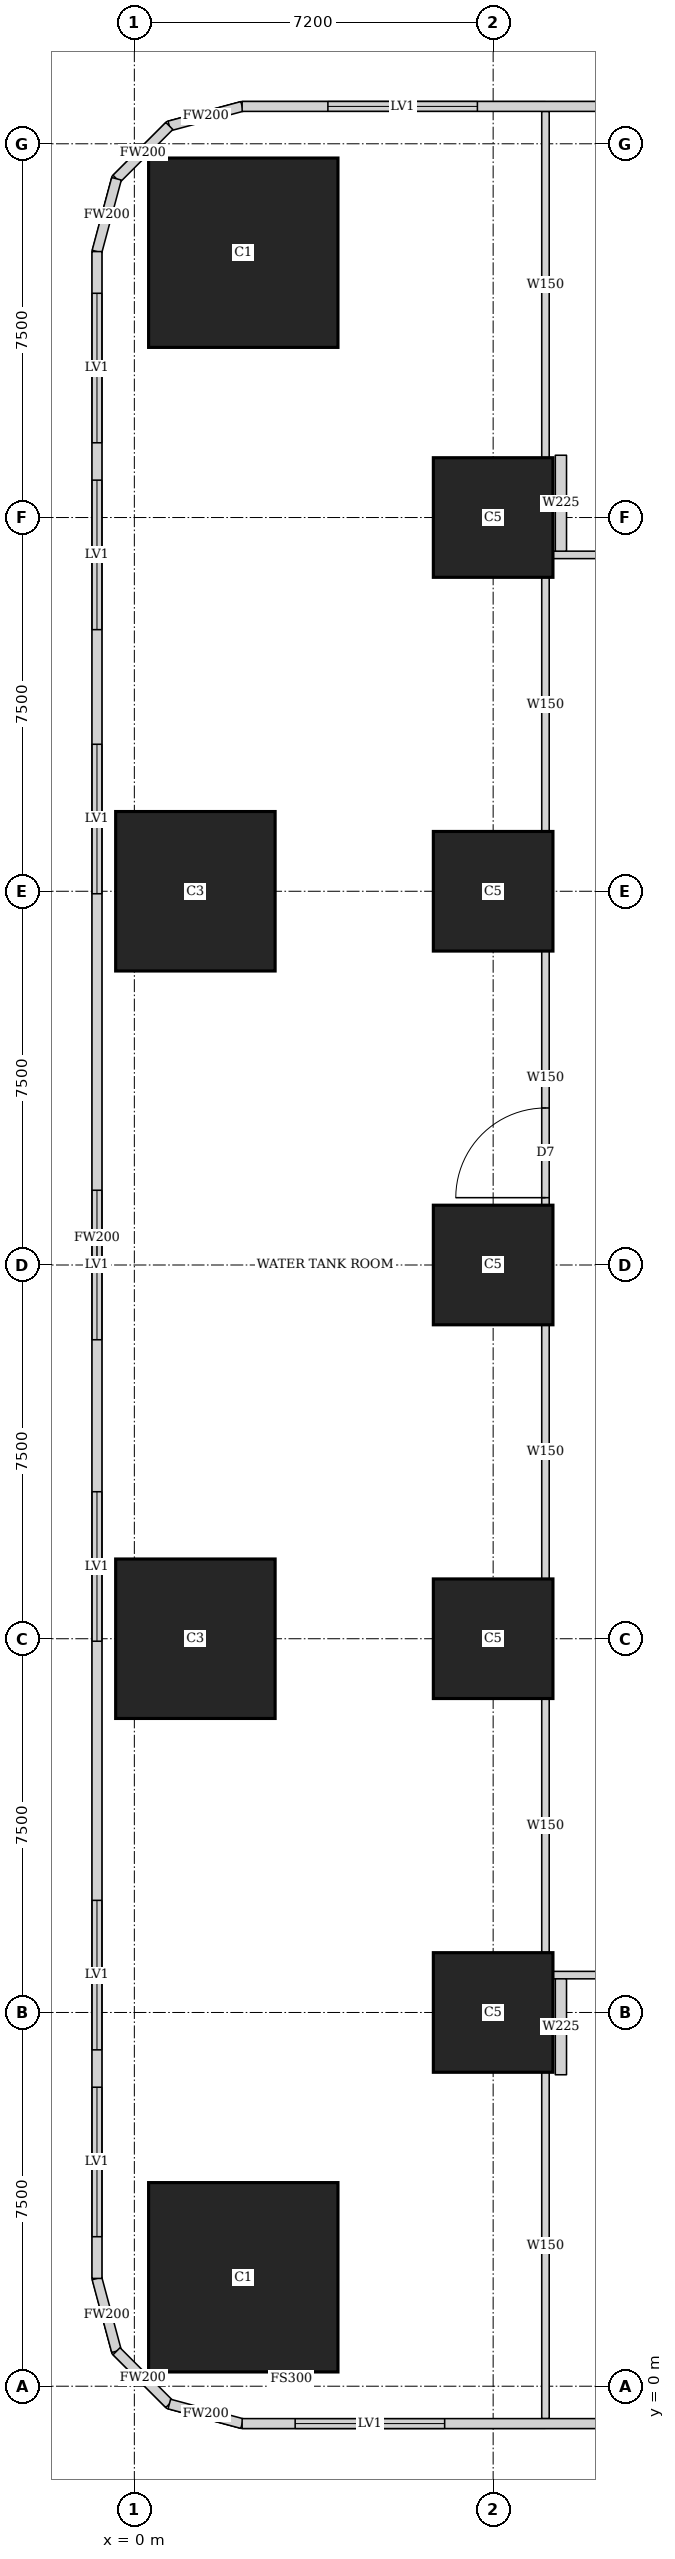
"""IFC4 building model, lengths in metres.
Left out: names, types, materials, properties, quantities, classifications, styles, units other than length and angle.
Written with IfcOpenShell. Run it as: python <this file> out.ifc"""

import sys

from ifc_helpers import new_model, si_unit, direction, frame, frame_2d, origin, origin_2d, place, context, subcontext, project, spatial, rectangle, extrude, element, fill, save


model = new_model("IFC4")
c1 = context("Model", 3, precision=1e-05, world=origin(), true_north=direction((0.0, 1.0)))
c2 = subcontext(c1, "Body", "Model", "MODEL_VIEW")
j1 = project(units=[si_unit("LENGTHUNIT", "METRE"), si_unit("PLANEANGLEUNIT", "RADIAN")], contexts=[c1])
p1 = place(None, origin())
s1 = spatial("IfcSite", under=j1, at=p1, CompositionType="ELEMENT")
p2 = place(p1, origin())
s2 = spatial("IfcBuilding", under=s1, at=p2, CompositionType="ELEMENT")
p3 = place(p2, frame((0.0, 0.0, 14.6)))
s3 = spatial("IfcBuildingStorey", under=s2, at=p3, CompositionType="ELEMENT", Elevation=14.6)
p4 = place(p3, frame((2.186, 2.186, 0.0), z_axis=(0.0, 0.0, 1.0), x_axis=(1.0, 0.0, 0.0)))
e1 = element("IfcColumn", 1, at=p4, inside=s3, PredefinedType="COLUMN", context=c2, shape_type="SweptSolid", body=[
    extrude(rectangle(XDim=3.8, YDim=3.8, at=origin_2d()), origin(), (0.0, 0.0, 1.0), 5.4),
])
p5 = place(p3, frame((7.2, 7.5, 0.0), z_axis=(0.0, 0.0, 1.0), x_axis=(1.0, 0.0, 0.0)))
e2 = element("IfcColumn", 2, at=p5, inside=s3, PredefinedType="COLUMN", context=c2, shape_type="SweptSolid", body=[
    extrude(rectangle(XDim=2.4, YDim=2.4, at=origin_2d()), origin(), (0.0, 0.0, 1.0), 5.4),
])
p6 = place(p3, frame((1.225, 15.0, 0.0), z_axis=(0.0, 0.0, 1.0), x_axis=(1.0, 0.0, 0.0)))
e3 = element("IfcColumn", 3, at=p6, inside=s3, PredefinedType="COLUMN", context=c2, shape_type="SweptSolid", body=[
    extrude(rectangle(XDim=3.2, YDim=3.2, at=origin_2d()), origin(), (0.0, 0.0, 1.0), 5.4),
])
for number, where, z_axis, x_axis in (
    (4, (7.2, 15.0, 0.0), (0.0, 0.0, 1.0), (1.0, 0.0, 0.0)),
    (5, (7.2, 22.5, 0.0), (0.0, 0.0, 1.0), (1.0, 0.0, 0.0)),
):
    element("IfcColumn", number, at=place(p3, frame(where, z_axis=z_axis, x_axis=x_axis)), inside=s3, PredefinedType="COLUMN", context=c2, shape_type="SweptSolid", body=[
        extrude(rectangle(XDim=2.4, YDim=2.4, at=origin_2d()), origin(), (0.0, 0.0, 1.0), 5.4),
    ])
p7 = place(p3, frame((1.225, 30.0, 0.0), z_axis=(0.0, 0.0, 1.0), x_axis=(1.0, 0.0, 0.0)))
e6 = element("IfcColumn", 6, at=p7, inside=s3, PredefinedType="COLUMN", context=c2, shape_type="SweptSolid", body=[
    extrude(rectangle(XDim=3.2, YDim=3.2, at=origin_2d()), origin(), (0.0, 0.0, 1.0), 5.4),
])
for number, where, z_axis, x_axis in (
    (7, (7.2, 30.0, 0.0), (0.0, 0.0, 1.0), (1.0, 0.0, 0.0)),
    (8, (7.2, 37.5, 0.0), (0.0, 0.0, 1.0), (1.0, 0.0, 0.0)),
):
    element("IfcColumn", number, at=place(p3, frame(where, z_axis=z_axis, x_axis=x_axis)), inside=s3, PredefinedType="COLUMN", context=c2, shape_type="SweptSolid", body=[
        extrude(rectangle(XDim=2.4, YDim=2.4, at=origin_2d()), origin(), (0.0, 0.0, 1.0), 5.4),
    ])
p8 = place(p3, frame((2.186, 42.814, 0.0), z_axis=(0.0, 0.0, 1.0), x_axis=(1.0, 0.0, 0.0)))
e9 = element("IfcColumn", 9, at=p8, inside=s3, PredefinedType="COLUMN", context=c2, shape_type="SweptSolid", body=[
    extrude(rectangle(XDim=3.8, YDim=3.8, at=origin_2d()), origin(), (0.0, 0.0, 1.0), 5.4),
])
p9 = place(p3, frame((2.163, -0.75, 0.0), z_axis=(0.0, 0.0, 1.0), x_axis=(1.0, 0.0, 0.0)))
e10 = element("IfcWall", 10, at=p9, inside=s3, PredefinedType="SOLIDWALL", context=c2, shape_type="SweptSolid", body=[
    extrude(rectangle(XDim=45.628, YDim=0.2, at=frame_2d((22.814, 0.0))), origin(), (0.0, 0.0, 1.0), 5.1),
])
p10 = place(p9, frame((1.064, 0.0, 0.6)))
e11 = element("IfcOpeningElement", 11, at=p10, cuts=e10, PredefinedType="OPENING", context=c2, shape_type="SweptSolid", body=[
    extrude(rectangle(XDim=3.0, YDim=2.4, at=frame_2d((1.5, 1.2))), frame((0.0, 0.11, 0.0), z_axis=(0.0, -1.0, 0.0), x_axis=(1.0, 0.0, 0.0)), (0.0, 0.0, 1.0), 0.22),
])
p11 = place(p9, frame((10.064, 0.0, 0.6)))
e12 = element("IfcOpeningElement", 12, at=p11, cuts=e10, PredefinedType="OPENING", context=c2, shape_type="SweptSolid", body=[
    extrude(rectangle(XDim=3.0, YDim=2.4, at=frame_2d((1.5, 1.2))), frame((0.0, 0.11, 0.0), z_axis=(0.0, -1.0, 0.0), x_axis=(1.0, 0.0, 0.0)), (0.0, 0.0, 1.0), 0.22),
])
p12 = place(p9, frame((18.614, 0.0, 0.6)))
e13 = element("IfcOpeningElement", 13, at=p12, cuts=e10, PredefinedType="OPENING", context=c2, shape_type="SweptSolid", body=[
    extrude(rectangle(XDim=3.0, YDim=2.4, at=frame_2d((1.5, 1.2))), frame((0.0, 0.11, 0.0), z_axis=(0.0, -1.0, 0.0), x_axis=(1.0, 0.0, 0.0)), (0.0, 0.0, 1.0), 0.22),
])
p13 = place(p9, frame((23.814, 0.0, 0.6)))
e14 = element("IfcOpeningElement", 14, at=p13, cuts=e10, PredefinedType="OPENING", context=c2, shape_type="SweptSolid", body=[
    extrude(rectangle(XDim=3.0, YDim=2.4, at=frame_2d((1.5, 1.2))), frame((0.0, 0.11, 0.0), z_axis=(0.0, -1.0, 0.0), x_axis=(1.0, 0.0, 0.0)), (0.0, 0.0, 1.0), 0.22),
])
p14 = place(p9, frame((32.564, 0.0, 0.6)))
e15 = element("IfcOpeningElement", 15, at=p14, cuts=e10, PredefinedType="OPENING", context=c2, shape_type="SweptSolid", body=[
    extrude(rectangle(XDim=3.0, YDim=2.4, at=frame_2d((1.5, 1.2))), frame((0.0, 0.11, 0.0), z_axis=(0.0, -1.0, 0.0), x_axis=(1.0, 0.0, 0.0)), (0.0, 0.0, 1.0), 0.22),
])
p15 = place(p9, frame((38.214, 0.0, 0.6)))
e16 = element("IfcOpeningElement", 16, at=p15, cuts=e10, PredefinedType="OPENING", context=c2, shape_type="SweptSolid", body=[
    extrude(rectangle(XDim=3.0, YDim=2.4, at=frame_2d((1.5, 1.2))), frame((0.0, 0.11, 0.0), z_axis=(0.0, -1.0, 0.0), x_axis=(1.0, 0.0, 0.0)), (0.0, 0.0, 1.0), 0.22),
])
p16 = place(p9, frame((41.564, 0.0, 0.6)))
e17 = element("IfcOpeningElement", 17, at=p16, cuts=e10, PredefinedType="OPENING", context=c2, shape_type="SweptSolid", body=[
    extrude(rectangle(XDim=3.0, YDim=2.4, at=frame_2d((1.5, 1.2))), frame((0.0, 0.11, 0.0), z_axis=(0.0, -1.0, 0.0), x_axis=(1.0, 0.0, 0.0)), (0.0, 0.0, 1.0), 0.22),
])
p17 = place(p3, frame((40.106, 45.75, 0.0), z_axis=(0.0, 0.0, 1.0), x_axis=(-1.0, 0.0, 0.0)))
e18 = element("IfcWall", 18, at=p17, inside=s3, PredefinedType="SOLIDWALL", context=c2, shape_type="SweptSolid", body=[
    extrude(rectangle(XDim=37.943, YDim=0.2, at=frame_2d((18.971, 0.0))), origin(), (0.0, 0.0, 1.0), 5.1),
])
p18 = place(p17, frame((1.722, 0.0, 0.6)))
e19 = element("IfcOpeningElement", 19, at=p18, cuts=e18, PredefinedType="OPENING", context=c2, shape_type="SweptSolid", body=[
    extrude(rectangle(XDim=3.0, YDim=2.4, at=frame_2d((1.5, 1.2))), frame((0.0, 0.11, 0.0), z_axis=(0.0, -1.0, 0.0), x_axis=(1.0, 0.0, 0.0)), (0.0, 0.0, 1.0), 0.22),
])
p19 = place(p17, frame((10.222, 0.0, 0.6)))
e20 = element("IfcOpeningElement", 20, at=p19, cuts=e18, PredefinedType="OPENING", context=c2, shape_type="SweptSolid", body=[
    extrude(rectangle(XDim=3.0, YDim=2.4, at=frame_2d((1.5, 1.2))), frame((0.0, 0.11, 0.0), z_axis=(0.0, -1.0, 0.0), x_axis=(1.0, 0.0, 0.0)), (0.0, 0.0, 1.0), 0.22),
])
p20 = place(p17, frame((16.322, 0.0, 0.6)))
e21 = element("IfcOpeningElement", 21, at=p20, cuts=e18, PredefinedType="OPENING", context=c2, shape_type="SweptSolid", body=[
    extrude(rectangle(XDim=3.0, YDim=2.4, at=frame_2d((1.5, 1.2))), frame((0.0, 0.11, 0.0), z_axis=(0.0, -1.0, 0.0), x_axis=(1.0, 0.0, 0.0)), (0.0, 0.0, 1.0), 0.22),
])
p21 = place(p17, frame((24.222, 0.0, 0.6)))
e22 = element("IfcOpeningElement", 22, at=p21, cuts=e18, PredefinedType="OPENING", context=c2, shape_type="SweptSolid", body=[
    extrude(rectangle(XDim=3.0, YDim=2.4, at=frame_2d((1.5, 1.2))), frame((0.0, 0.11, 0.0), z_axis=(0.0, -1.0, 0.0), x_axis=(1.0, 0.0, 0.0)), (0.0, 0.0, 1.0), 0.22),
])
p22 = place(p17, frame((33.222, 0.0, 0.6)))
e23 = element("IfcOpeningElement", 23, at=p22, cuts=e18, PredefinedType="OPENING", context=c2, shape_type="SweptSolid", body=[
    extrude(rectangle(XDim=3.0, YDim=2.4, at=frame_2d((1.5, 1.2))), frame((0.0, 0.11, 0.0), z_axis=(0.0, -1.0, 0.0), x_axis=(1.0, 0.0, 0.0)), (0.0, 0.0, 1.0), 0.22),
])
p23 = place(p3, frame((2.163, 45.75, 0.0), z_axis=(0.0, 0.0, 1.0), x_axis=(-0.965832000415, -0.259168954497, 0.0)))
e24 = element("IfcWall", 24, at=p23, inside=s3, PredefinedType="SOLIDWALL", context=c2, shape_type="SweptSolid", body=[
    extrude(rectangle(XDim=1.513, YDim=0.2, at=frame_2d((0.756, 0.0))), origin(), (0.0, 0.0, 1.0), 5.1),
])
p24 = place(p3, frame((0.702, 45.358, 0.0), z_axis=(0.0, 0.0, 1.0), x_axis=(-0.707106781187, -0.707106781187, 0.0)))
e25 = element("IfcWall", 25, at=p24, inside=s3, PredefinedType="SOLIDWALL", context=c2, shape_type="SweptSolid", body=[
    extrude(rectangle(XDim=1.499, YDim=0.2, at=frame_2d((0.75, 0.0))), origin(), (0.0, 0.0, 1.0), 5.1),
])
p25 = place(p3, frame((-0.358, 44.298, 0.0), z_axis=(0.0, 0.0, 1.0), x_axis=(-0.259168954497, -0.965832000415, 0.0)))
e26 = element("IfcWall", 26, at=p25, inside=s3, PredefinedType="SOLIDWALL", context=c2, shape_type="SweptSolid", body=[
    extrude(rectangle(XDim=1.513, YDim=0.2, at=frame_2d((0.756, 0.0))), origin(), (0.0, 0.0, 1.0), 5.1),
])
p26 = place(p3, frame((-0.75, 42.837, 0.0), z_axis=(0.0, 0.0, 1.0), x_axis=(0.0, -1.0, 0.0)))
e27 = element("IfcWall", 27, at=p26, inside=s3, PredefinedType="SOLIDWALL", context=c2, shape_type="SweptSolid", body=[
    extrude(rectangle(XDim=40.674, YDim=0.2, at=frame_2d((20.337, 0.0))), origin(), (0.0, 0.0, 1.0), 5.1),
])
p27 = place(p26, frame((0.837, 0.0, 0.6)))
e28 = element("IfcOpeningElement", 28, at=p27, cuts=e27, PredefinedType="OPENING", context=c2, shape_type="SweptSolid", body=[
    extrude(rectangle(XDim=3.0, YDim=2.4, at=frame_2d((1.5, 1.2))), frame((0.0, 0.11, 0.0), z_axis=(0.0, -1.0, 0.0), x_axis=(1.0, 0.0, 0.0)), (0.0, 0.0, 1.0), 0.22),
])
p28 = place(p26, frame((4.587, 0.0, 0.6)))
e29 = element("IfcOpeningElement", 29, at=p28, cuts=e27, PredefinedType="OPENING", context=c2, shape_type="SweptSolid", body=[
    extrude(rectangle(XDim=3.0, YDim=2.4, at=frame_2d((1.5, 1.2))), frame((0.0, 0.11, 0.0), z_axis=(0.0, -1.0, 0.0), x_axis=(1.0, 0.0, 0.0)), (0.0, 0.0, 1.0), 0.22),
])
p29 = place(p26, frame((9.887, 0.0, 0.6)))
e30 = element("IfcOpeningElement", 30, at=p29, cuts=e27, PredefinedType="OPENING", context=c2, shape_type="SweptSolid", body=[
    extrude(rectangle(XDim=3.0, YDim=2.4, at=frame_2d((1.5, 1.2))), frame((0.0, 0.11, 0.0), z_axis=(0.0, -1.0, 0.0), x_axis=(1.0, 0.0, 0.0)), (0.0, 0.0, 1.0), 0.22),
])
p30 = place(p26, frame((18.837, 0.0, 0.6)))
e31 = element("IfcOpeningElement", 31, at=p30, cuts=e27, PredefinedType="OPENING", context=c2, shape_type="SweptSolid", body=[
    extrude(rectangle(XDim=3.0, YDim=2.4, at=frame_2d((1.5, 1.2))), frame((0.0, 0.11, 0.0), z_axis=(0.0, -1.0, 0.0), x_axis=(1.0, 0.0, 0.0)), (0.0, 0.0, 1.0), 0.22),
])
p31 = place(p26, frame((24.887, 0.0, 0.6)))
e32 = element("IfcOpeningElement", 32, at=p31, cuts=e27, PredefinedType="OPENING", context=c2, shape_type="SweptSolid", body=[
    extrude(rectangle(XDim=3.0, YDim=2.4, at=frame_2d((1.5, 1.2))), frame((0.0, 0.11, 0.0), z_axis=(0.0, -1.0, 0.0), x_axis=(1.0, 0.0, 0.0)), (0.0, 0.0, 1.0), 0.22),
])
p32 = place(p26, frame((33.087, 0.0, 0.6)))
e33 = element("IfcOpeningElement", 33, at=p32, cuts=e27, PredefinedType="OPENING", context=c2, shape_type="SweptSolid", body=[
    extrude(rectangle(XDim=3.0, YDim=2.4, at=frame_2d((1.5, 1.2))), frame((0.0, 0.11, 0.0), z_axis=(0.0, -1.0, 0.0), x_axis=(1.0, 0.0, 0.0)), (0.0, 0.0, 1.0), 0.22),
])
p33 = place(p26, frame((36.837, 0.0, 0.6)))
e34 = element("IfcOpeningElement", 34, at=p33, cuts=e27, PredefinedType="OPENING", context=c2, shape_type="SweptSolid", body=[
    extrude(rectangle(XDim=3.0, YDim=2.4, at=frame_2d((1.5, 1.2))), frame((0.0, 0.11, 0.0), z_axis=(0.0, -1.0, 0.0), x_axis=(1.0, 0.0, 0.0)), (0.0, 0.0, 1.0), 0.22),
])
p34 = place(p3, frame((-0.75, 2.163, 0.0), z_axis=(0.0, 0.0, 1.0), x_axis=(0.259168954497, -0.965832000415, 0.0)))
e35 = element("IfcWall", 35, at=p34, inside=s3, PredefinedType="SOLIDWALL", context=c2, shape_type="SweptSolid", body=[
    extrude(rectangle(XDim=1.513, YDim=0.2, at=frame_2d((0.756, 0.0))), origin(), (0.0, 0.0, 1.0), 5.1),
])
p35 = place(p3, frame((-0.358, 0.702, 0.0), z_axis=(0.0, 0.0, 1.0), x_axis=(0.707106781187, -0.707106781187, 0.0)))
e36 = element("IfcWall", 36, at=p35, inside=s3, PredefinedType="SOLIDWALL", context=c2, shape_type="SweptSolid", body=[
    extrude(rectangle(XDim=1.499, YDim=0.2, at=frame_2d((0.75, 0.0))), origin(), (0.0, 0.0, 1.0), 5.1),
])
p36 = place(p3, frame((0.702, -0.358, 0.0), z_axis=(0.0, 0.0, 1.0), x_axis=(0.965832000415, -0.259168954497, 0.0)))
e37 = element("IfcWall", 37, at=p36, inside=s3, PredefinedType="SOLIDWALL", context=c2, shape_type="SweptSolid", body=[
    extrude(rectangle(XDim=1.513, YDim=0.2, at=frame_2d((0.756, 0.0))), origin(), (0.0, 0.0, 1.0), 5.1),
])
p37 = place(p3, frame((8.25, -0.65, 0.0), z_axis=(0.0, 0.0, 1.0), x_axis=(0.0, 1.0, 0.0)))
e38 = element("IfcWall", 38, at=p37, inside=s3, PredefinedType="SOLIDWALL", context=c2, shape_type="SweptSolid", body=[
    extrude(rectangle(XDim=6.949, YDim=0.15, at=frame_2d((3.475, 0.0))), origin(), (0.0, 0.0, 1.0), 5.1),
])
for number, where, z_axis, x_axis in (
    (39, (8.25, 8.701, 0.0), (0.0, 0.0, 1.0), (0.0, 1.0, 0.0)),
    (40, (8.25, 16.201, 0.0), (0.0, 0.0, 1.0), (0.0, 1.0, 0.0)),
):
    element("IfcWall", number, at=place(p3, frame(where, z_axis=z_axis, x_axis=x_axis)), inside=s3, PredefinedType="SOLIDWALL", context=c2, shape_type="SweptSolid", body=[
        extrude(rectangle(XDim=5.098, YDim=0.15, at=frame_2d((2.549, 0.0))), origin(), (0.0, 0.0, 1.0), 5.1),
    ])
p38 = place(p3, frame((8.25, 23.701, 0.0), z_axis=(0.0, 0.0, 1.0), x_axis=(0.0, 1.0, 0.0)))
e41 = element("IfcWall", 41, at=p38, inside=s3, PredefinedType="SOLIDWALL", context=c2, shape_type="SweptSolid", body=[
    extrude(rectangle(XDim=5.098, YDim=0.15, at=frame_2d((2.549, 0.0))), origin(), (0.0, 0.0, 1.0), 5.1),
])
p39 = place(p38, frame((0.15, 0.0, 0.0)))
e42 = element("IfcOpeningElement", 42, at=p39, cuts=e41, PredefinedType="OPENING", context=c2, shape_type="SweptSolid", body=[
    extrude(rectangle(XDim=1.8, YDim=2.4, at=frame_2d((0.9, 1.2))), frame((0.0, 0.085, 0.0), z_axis=(0.0, -1.0, 0.0), x_axis=(1.0, 0.0, 0.0)), (0.0, 0.0, 1.0), 0.17),
])
p40 = place(p3, frame((8.25, 31.201, 0.0), z_axis=(0.0, 0.0, 1.0), x_axis=(0.0, 1.0, 0.0)))
e43 = element("IfcWall", 43, at=p40, inside=s3, PredefinedType="SOLIDWALL", context=c2, shape_type="SweptSolid", body=[
    extrude(rectangle(XDim=5.098, YDim=0.15, at=frame_2d((2.549, 0.0))), origin(), (0.0, 0.0, 1.0), 5.1),
])
p41 = place(p3, frame((8.25, 38.701, 0.0), z_axis=(0.0, 0.0, 1.0), x_axis=(0.0, 1.0, 0.0)))
e44 = element("IfcWall", 44, at=p41, inside=s3, PredefinedType="SOLIDWALL", context=c2, shape_type="SweptSolid", body=[
    extrude(rectangle(XDim=6.949, YDim=0.15, at=frame_2d((3.475, 0.0))), origin(), (0.0, 0.0, 1.0), 5.1),
])
for number, where, z_axis, x_axis in (
    (45, (13.199, 8.25, 0.0), (0.0, 0.0, 1.0), (-1.0, 0.0, 0.0)),
    (46, (8.401, 36.75, 0.0), (0.0, 0.0, 1.0), (1.0, 0.0, 0.0)),
):
    element("IfcWall", number, at=place(p3, frame(where, z_axis=z_axis, x_axis=x_axis)), inside=s3, PredefinedType="SOLIDWALL", context=c2, shape_type="SweptSolid", body=[
        extrude(rectangle(XDim=4.798, YDim=0.15, at=frame_2d((2.399, 0.0))), origin(), (0.0, 0.0, 1.0), 3.5),
    ])
for number, where, z_axis, x_axis in (
    (47, (8.56, 6.25, 0.0), (0.0, 0.0, 1.0), (0.0, 1.0, 0.0)),
    (48, (8.56, 36.825, 0.0), (0.0, 0.0, 1.0), (0.0, 1.0, 0.0)),
):
    element("IfcWall", number, at=place(p3, frame(where, z_axis=z_axis, x_axis=x_axis)), inside=s3, PredefinedType="SOLIDWALL", context=c2, shape_type="SweptSolid", body=[
        extrude(rectangle(XDim=1.925, YDim=0.225, at=frame_2d((0.962, 0.0))), origin(), (0.0, 0.0, 1.0), 3.5),
    ])
p42 = place(p10, origin())
e49 = element("IfcWindow", 49, at=p42, inside=s3, PartitioningType="SINGLE_PANEL", PredefinedType="USERDEFINED", context=c2, shape_type="SweptSolid", body=[
    extrude(rectangle(XDim=3.0, YDim=2.4, at=frame_2d((1.5, 1.2))), frame((0.0, 0.03, 0.0), z_axis=(0.0, -1.0, 0.0), x_axis=(1.0, 0.0, 0.0)), (0.0, 0.0, 1.0), 0.06),
])
fill(e11, e49)
p43 = place(p22, origin())
e50 = element("IfcWindow", 50, at=p43, inside=s3, PartitioningType="SINGLE_PANEL", PredefinedType="USERDEFINED", context=c2, shape_type="SweptSolid", body=[
    extrude(rectangle(XDim=3.0, YDim=2.4, at=frame_2d((1.5, 1.2))), frame((0.0, 0.03, 0.0), z_axis=(0.0, -1.0, 0.0), x_axis=(1.0, 0.0, 0.0)), (0.0, 0.0, 1.0), 0.06),
])
fill(e23, e50)
p44 = place(p27, origin())
e51 = element("IfcWindow", 51, at=p44, inside=s3, PartitioningType="SINGLE_PANEL", PredefinedType="USERDEFINED", context=c2, shape_type="SweptSolid", body=[
    extrude(rectangle(XDim=3.0, YDim=2.4, at=frame_2d((1.5, 1.2))), frame((0.0, 0.03, 0.0), z_axis=(0.0, -1.0, 0.0), x_axis=(1.0, 0.0, 0.0)), (0.0, 0.0, 1.0), 0.06),
])
fill(e28, e51)
p45 = place(p28, origin())
e52 = element("IfcWindow", 52, at=p45, inside=s3, PartitioningType="SINGLE_PANEL", PredefinedType="USERDEFINED", context=c2, shape_type="SweptSolid", body=[
    extrude(rectangle(XDim=3.0, YDim=2.4, at=frame_2d((1.5, 1.2))), frame((0.0, 0.03, 0.0), z_axis=(0.0, -1.0, 0.0), x_axis=(1.0, 0.0, 0.0)), (0.0, 0.0, 1.0), 0.06),
])
fill(e29, e52)
p46 = place(p29, origin())
e53 = element("IfcWindow", 53, at=p46, inside=s3, PartitioningType="SINGLE_PANEL", PredefinedType="USERDEFINED", context=c2, shape_type="SweptSolid", body=[
    extrude(rectangle(XDim=3.0, YDim=2.4, at=frame_2d((1.5, 1.2))), frame((0.0, 0.03, 0.0), z_axis=(0.0, -1.0, 0.0), x_axis=(1.0, 0.0, 0.0)), (0.0, 0.0, 1.0), 0.06),
])
fill(e30, e53)
p47 = place(p30, origin())
e54 = element("IfcWindow", 54, at=p47, inside=s3, PartitioningType="SINGLE_PANEL", PredefinedType="USERDEFINED", context=c2, shape_type="SweptSolid", body=[
    extrude(rectangle(XDim=3.0, YDim=2.4, at=frame_2d((1.5, 1.2))), frame((0.0, 0.03, 0.0), z_axis=(0.0, -1.0, 0.0), x_axis=(1.0, 0.0, 0.0)), (0.0, 0.0, 1.0), 0.06),
])
fill(e31, e54)
p48 = place(p31, origin())
e55 = element("IfcWindow", 55, at=p48, inside=s3, PartitioningType="SINGLE_PANEL", PredefinedType="USERDEFINED", context=c2, shape_type="SweptSolid", body=[
    extrude(rectangle(XDim=3.0, YDim=2.4, at=frame_2d((1.5, 1.2))), frame((0.0, 0.03, 0.0), z_axis=(0.0, -1.0, 0.0), x_axis=(1.0, 0.0, 0.0)), (0.0, 0.0, 1.0), 0.06),
])
fill(e32, e55)
p49 = place(p32, origin())
e56 = element("IfcWindow", 56, at=p49, inside=s3, PartitioningType="SINGLE_PANEL", PredefinedType="USERDEFINED", context=c2, shape_type="SweptSolid", body=[
    extrude(rectangle(XDim=3.0, YDim=2.4, at=frame_2d((1.5, 1.2))), frame((0.0, 0.03, 0.0), z_axis=(0.0, -1.0, 0.0), x_axis=(1.0, 0.0, 0.0)), (0.0, 0.0, 1.0), 0.06),
])
fill(e33, e56)
p50 = place(p33, origin())
e57 = element("IfcWindow", 57, at=p50, inside=s3, PartitioningType="SINGLE_PANEL", PredefinedType="USERDEFINED", context=c2, shape_type="SweptSolid", body=[
    extrude(rectangle(XDim=3.0, YDim=2.4, at=frame_2d((1.5, 1.2))), frame((0.0, 0.03, 0.0), z_axis=(0.0, -1.0, 0.0), x_axis=(1.0, 0.0, 0.0)), (0.0, 0.0, 1.0), 0.06),
])
fill(e34, e57)
p51 = place(p39, origin())
e58 = element("IfcDoor", 58, at=p51, inside=s3, OperationType="DOUBLE_DOOR_SINGLE_SWING", PredefinedType="DOOR", context=c2, shape_type="SweptSolid", body=[
    extrude(rectangle(XDim=1.8, YDim=2.4, at=frame_2d((0.9, 1.2))), frame((0.0, 0.025, 0.0), z_axis=(0.0, -1.0, 0.0), x_axis=(1.0, 0.0, 0.0)), (0.0, 0.0, 1.0), 0.05),
])
fill(e42, e58)
save(model, sys.argv[1])
